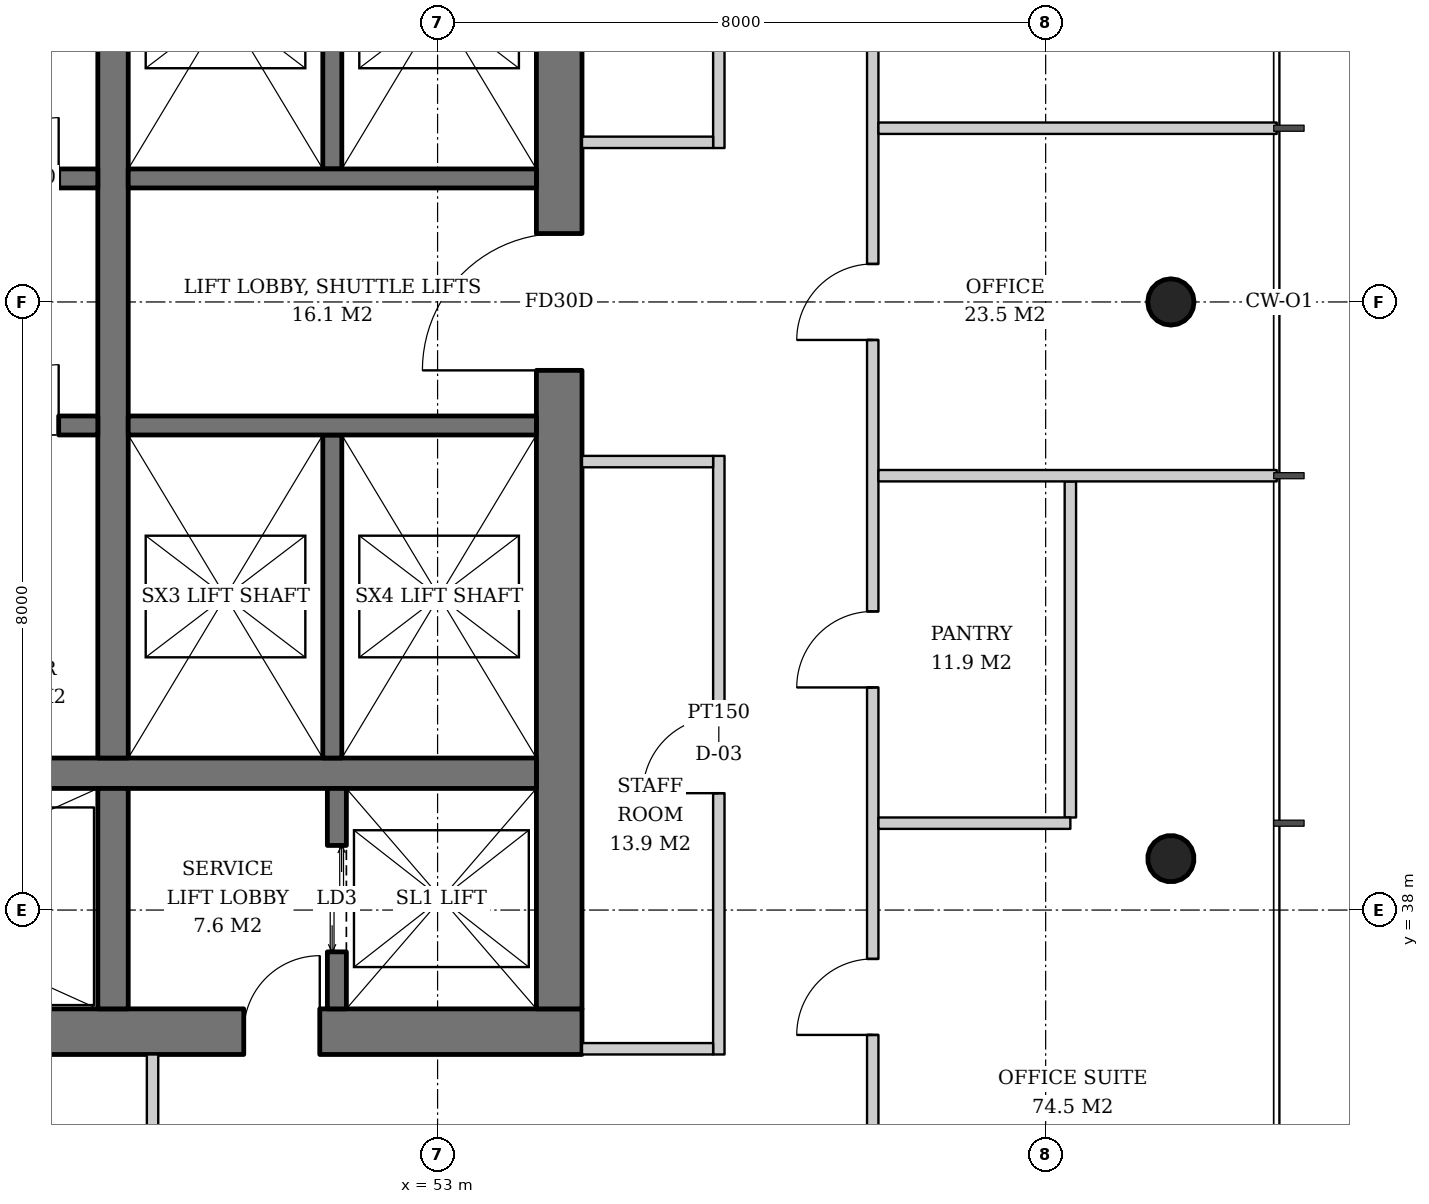
"""IFC4 building model, lengths in metres.
Left out: names, types, materials, properties, quantities, classifications, styles, units other than length and angle.
Written with IfcOpenShell. Run it as: python <this file> out.ifc"""

import sys

from ifc_helpers import new_model, si_unit, direction, frame, frame_2d, origin, origin_2d, place, context, subcontext, project, spatial, rectangle, hollow_circle, extrude, element, fill, save


model = new_model("IFC4")
c1 = context("Model", 3, precision=1e-05, world=origin(), true_north=direction((0.0, 1.0)))
c2 = subcontext(c1, "Body", "Model", "MODEL_VIEW")
j1 = project(units=[si_unit("LENGTHUNIT", "METRE"), si_unit("PLANEANGLEUNIT", "RADIAN")], contexts=[c1])
p1 = place(None, origin())
s1 = spatial("IfcSite", under=j1, at=p1, CompositionType="ELEMENT")
p2 = place(p1, origin())
s2 = spatial("IfcBuilding", under=s1, at=p2, CompositionType="ELEMENT")
p3 = place(p2, frame((0.0, 0.0, 218.6)))
s3 = spatial("IfcBuildingStorey", under=s2, at=p3, CompositionType="ELEMENT", Elevation=218.6)
p4 = place(p3, frame((62.686, 38.657, 0.0), z_axis=(-0.031976494272, 0.015924037308, 0.99936176075), x_axis=(-0.445775033553, -0.895145027055, 0.0)))
e1 = element("IfcColumn", 1, at=p4, inside=s3, PredefinedType="COLUMN", context=c2, shape_type="SweptSolid", body=[
    extrude(hollow_circle(Radius=0.305, WallThickness=0.025, at=origin_2d()), origin(), (0.0, 0.0, 1.0), 3.802),
])
p5 = place(p3, frame((62.686, 46.0, 0.0), z_axis=(-0.031980549263, 0.0, 0.999488491414), x_axis=(0.0, -1.0, 0.0)))
e2 = element("IfcColumn", 2, at=p5, inside=s3, PredefinedType="COLUMN", context=c2, shape_type="SweptSolid", body=[
    extrude(hollow_circle(Radius=0.305, WallThickness=0.025, at=origin_2d()), origin(), (0.0, 0.0, 1.0), 3.802),
])
p6 = place(p3, frame((35.1, 36.4, 0.0), z_axis=(0.0, 0.0, 1.0), x_axis=(1.0, 0.0, 0.0)))
e3 = element("IfcWall", 3, at=p6, inside=s3, PredefinedType="SHEAR", context=c2, shape_type="SweptSolid", body=[
    extrude(rectangle(XDim=19.8, YDim=0.6, at=frame_2d((9.9, 0.0))), origin(), (0.0, 0.0, 1.0), 3.8),
])
p7 = place(p6, frame((3.9, 0.0, 0.0)))
e4 = element("IfcOpeningElement", 4, at=p7, cuts=e3, PredefinedType="OPENING", context=c2, shape_type="SweptSolid", body=[
    extrude(rectangle(XDim=1.0, YDim=2.1, at=frame_2d((0.5, 1.05))), frame((0.0, 0.31, 0.0), z_axis=(0.0, -1.0, 0.0), x_axis=(1.0, 0.0, 0.0)), (0.0, 0.0, 1.0), 0.62),
])
p8 = place(p6, frame((15.35, 0.0, 0.0)))
e5 = element("IfcOpeningElement", 5, at=p8, cuts=e3, PredefinedType="OPENING", context=c2, shape_type="SweptSolid", body=[
    extrude(rectangle(XDim=1.0, YDim=2.1, at=frame_2d((0.5, 1.05))), frame((0.0, 0.31, 0.0), z_axis=(0.0, -1.0, 0.0), x_axis=(1.0, 0.0, 0.0)), (0.0, 0.0, 1.0), 0.62),
])
p9 = place(p3, frame((54.6, 36.7, 0.0), z_axis=(0.0, 0.0, 1.0), x_axis=(0.0, 1.0, 0.0)))
e6 = element("IfcWall", 6, at=p9, inside=s3, PredefinedType="SHEAR", context=c2, shape_type="SweptSolid", body=[
    extrude(rectangle(XDim=18.6, YDim=0.6, at=frame_2d((9.3, 0.0))), origin(), (0.0, 0.0, 1.0), 3.8),
])
p10 = place(p9, frame((8.4, 0.0, 0.0)))
e7 = element("IfcOpeningElement", 7, at=p10, cuts=e6, PredefinedType="OPENING", context=c2, shape_type="SweptSolid", body=[
    extrude(rectangle(XDim=1.8, YDim=2.4, at=frame_2d((0.9, 1.2))), frame((0.0, 0.31, 0.0), z_axis=(0.0, -1.0, 0.0), x_axis=(1.0, 0.0, 0.0)), (0.0, 0.0, 1.0), 0.62),
])
p11 = place(p3, frame((35.7, 39.8, 0.0), z_axis=(0.0, 0.0, 1.0), x_axis=(1.0, 0.0, 0.0)))
e8 = element("IfcWall", 8, at=p11, inside=s3, PredefinedType="SHEAR", context=c2, shape_type="SweptSolid", body=[
    extrude(rectangle(XDim=18.6, YDim=0.4, at=frame_2d((9.3, 0.0))), origin(), (0.0, 0.0, 1.0), 3.8),
])
p12 = place(p3, frame((48.73, 36.7, 0.0), z_axis=(0.0, 0.0, 1.0), x_axis=(0.0, 1.0, 0.0)))
e9 = element("IfcWall", 9, at=p12, inside=s3, PredefinedType="SHEAR", context=c2, shape_type="SweptSolid", body=[
    extrude(rectangle(XDim=2.9, YDim=0.4, at=frame_2d((1.45, 0.0))), origin(), (0.0, 0.0, 1.0), 3.8),
])
p13 = place(p3, frame((48.73, 40.0, 0.0), z_axis=(0.0, 0.0, 1.0), x_axis=(0.0, 1.0, 0.0)))
e10 = element("IfcWall", 10, at=p13, inside=s3, PredefinedType="SHEAR", context=c2, shape_type="SweptSolid", body=[
    extrude(rectangle(XDim=12.0, YDim=0.4, at=frame_2d((6.0, 0.0))), origin(), (0.0, 0.0, 1.0), 3.8),
])
p14 = place(p3, frame((51.675, 36.7, 0.0), z_axis=(0.0, 0.0, 1.0), x_axis=(0.0, 1.0, 0.0)))
e11 = element("IfcWall", 11, at=p14, inside=s3, PredefinedType="SHEAR", context=c2, shape_type="SweptSolid", body=[
    extrude(rectangle(XDim=2.9, YDim=0.25, at=frame_2d((1.45, 0.0))), origin(), (0.0, 0.0, 1.0), 3.8),
])
p15 = place(p14, frame((0.75, 0.0, 0.0)))
e12 = element("IfcOpeningElement", 12, at=p15, cuts=e11, PredefinedType="OPENING", context=c2, shape_type="SweptSolid", body=[
    extrude(rectangle(XDim=1.4, YDim=2.4, at=frame_2d((0.7, 1.2))), frame((0.0, 0.135, 0.0), z_axis=(0.0, -1.0, 0.0), x_axis=(1.0, 0.0, 0.0)), (0.0, 0.0, 1.0), 0.27),
])
p16 = place(p3, frame((35.7, 47.625, 0.0), z_axis=(0.0, 0.0, 1.0), x_axis=(1.0, 0.0, 0.0)))
e13 = element("IfcWall", 13, at=p16, inside=s3, PredefinedType="SHEAR", context=c2, shape_type="SweptSolid", body=[
    extrude(rectangle(XDim=12.83, YDim=0.25, at=frame_2d((6.415, 0.0))), origin(), (0.0, 0.0, 1.0), 3.8),
])
p17 = place(p16, frame((0.7, 0.0, 0.0)))
e14 = element("IfcOpeningElement", 14, at=p17, cuts=e13, PredefinedType="OPENING", context=c2, shape_type="SweptSolid", body=[
    extrude(rectangle(XDim=1.1, YDim=2.2, at=frame_2d((0.55, 1.1))), frame((0.0, 0.135, 0.0), z_axis=(0.0, -1.0, 0.0), x_axis=(1.0, 0.0, 0.0)), (0.0, 0.0, 1.0), 0.27),
])
p18 = place(p16, frame((3.45, 0.0, 0.0)))
e15 = element("IfcOpeningElement", 15, at=p18, cuts=e13, PredefinedType="OPENING", context=c2, shape_type="SweptSolid", body=[
    extrude(rectangle(XDim=1.1, YDim=2.2, at=frame_2d((0.55, 1.1))), frame((0.0, 0.135, 0.0), z_axis=(0.0, -1.0, 0.0), x_axis=(1.0, 0.0, 0.0)), (0.0, 0.0, 1.0), 0.27),
])
p19 = place(p16, frame((6.2, 0.0, 0.0)))
e16 = element("IfcOpeningElement", 16, at=p19, cuts=e13, PredefinedType="OPENING", context=c2, shape_type="SweptSolid", body=[
    extrude(rectangle(XDim=1.1, YDim=2.2, at=frame_2d((0.55, 1.1))), frame((0.0, 0.135, 0.0), z_axis=(0.0, -1.0, 0.0), x_axis=(1.0, 0.0, 0.0)), (0.0, 0.0, 1.0), 0.27),
])
p20 = place(p16, frame((9.0, 0.0, 0.0)))
e17 = element("IfcOpeningElement", 17, at=p20, cuts=e13, PredefinedType="OPENING", context=c2, shape_type="SweptSolid", body=[
    extrude(rectangle(XDim=1.0, YDim=2.1, at=frame_2d((0.5, 1.05))), frame((0.0, 0.135, 0.0), z_axis=(0.0, -1.0, 0.0), x_axis=(1.0, 0.0, 0.0)), (0.0, 0.0, 1.0), 0.27),
])
p21 = place(p16, frame((11.515, 0.0, 0.0)))
e18 = element("IfcOpeningElement", 18, at=p21, cuts=e13, PredefinedType="OPENING", context=c2, shape_type="SweptSolid", body=[
    extrude(rectangle(XDim=0.8, YDim=2.0, at=frame_2d((0.4, 1.0))), frame((0.0, 0.135, 0.0), z_axis=(0.0, -1.0, 0.0), x_axis=(1.0, 0.0, 0.0)), (0.0, 0.0, 1.0), 0.27),
])
p22 = place(p3, frame((35.7, 44.375, 0.0), z_axis=(0.0, 0.0, 1.0), x_axis=(1.0, 0.0, 0.0)))
e19 = element("IfcWall", 19, at=p22, inside=s3, PredefinedType="SHEAR", context=c2, shape_type="SweptSolid", body=[
    extrude(rectangle(XDim=12.83, YDim=0.25, at=frame_2d((6.415, 0.0))), origin(), (0.0, 0.0, 1.0), 3.8),
])
p23 = place(p22, frame((0.7, 0.0, 0.0)))
e20 = element("IfcOpeningElement", 20, at=p23, cuts=e19, PredefinedType="OPENING", context=c2, shape_type="SweptSolid", body=[
    extrude(rectangle(XDim=1.1, YDim=2.2, at=frame_2d((0.55, 1.1))), frame((0.0, 0.135, 0.0), z_axis=(0.0, -1.0, 0.0), x_axis=(1.0, 0.0, 0.0)), (0.0, 0.0, 1.0), 0.27),
])
p24 = place(p22, frame((3.45, 0.0, 0.0)))
e21 = element("IfcOpeningElement", 21, at=p24, cuts=e19, PredefinedType="OPENING", context=c2, shape_type="SweptSolid", body=[
    extrude(rectangle(XDim=1.1, YDim=2.2, at=frame_2d((0.55, 1.1))), frame((0.0, 0.135, 0.0), z_axis=(0.0, -1.0, 0.0), x_axis=(1.0, 0.0, 0.0)), (0.0, 0.0, 1.0), 0.27),
])
p25 = place(p22, frame((6.2, 0.0, 0.0)))
e22 = element("IfcOpeningElement", 22, at=p25, cuts=e19, PredefinedType="OPENING", context=c2, shape_type="SweptSolid", body=[
    extrude(rectangle(XDim=1.1, YDim=2.2, at=frame_2d((0.55, 1.1))), frame((0.0, 0.135, 0.0), z_axis=(0.0, -1.0, 0.0), x_axis=(1.0, 0.0, 0.0)), (0.0, 0.0, 1.0), 0.27),
])
p26 = place(p22, frame((9.0, 0.0, 0.0)))
e23 = element("IfcOpeningElement", 23, at=p26, cuts=e19, PredefinedType="OPENING", context=c2, shape_type="SweptSolid", body=[
    extrude(rectangle(XDim=1.0, YDim=2.1, at=frame_2d((0.5, 1.05))), frame((0.0, 0.135, 0.0), z_axis=(0.0, -1.0, 0.0), x_axis=(1.0, 0.0, 0.0)), (0.0, 0.0, 1.0), 0.27),
])
p27 = place(p22, frame((11.515, 0.0, 0.0)))
e24 = element("IfcOpeningElement", 24, at=p27, cuts=e19, PredefinedType="OPENING", context=c2, shape_type="SweptSolid", body=[
    extrude(rectangle(XDim=0.8, YDim=2.0, at=frame_2d((0.4, 1.0))), frame((0.0, 0.135, 0.0), z_axis=(0.0, -1.0, 0.0), x_axis=(1.0, 0.0, 0.0)), (0.0, 0.0, 1.0), 0.27),
])
p28 = place(p3, frame((51.615, 47.75, 0.0), z_axis=(0.0, 0.0, 1.0), x_axis=(0.0, 1.0, 0.0)))
e25 = element("IfcWall", 25, at=p28, inside=s3, PredefinedType="SHEAR", context=c2, shape_type="SweptSolid", body=[
    extrude(rectangle(XDim=4.25, YDim=0.25, at=frame_2d((2.125, 0.0))), origin(), (0.0, 0.0, 1.0), 3.8),
])
p29 = place(p3, frame((48.93, 47.625, 0.0), z_axis=(0.0, 0.0, 1.0), x_axis=(1.0, 0.0, 0.0)))
e26 = element("IfcWall", 26, at=p29, inside=s3, PredefinedType="SHEAR", context=c2, shape_type="SweptSolid", body=[
    extrude(rectangle(XDim=5.37, YDim=0.25, at=frame_2d((2.685, 0.0))), origin(), (0.0, 0.0, 1.0), 3.8),
])
p30 = place(p3, frame((51.615, 44.25, 0.0), z_axis=(0.0, 0.0, 1.0), x_axis=(0.0, -1.0, 0.0)))
e27 = element("IfcWall", 27, at=p30, inside=s3, PredefinedType="SHEAR", context=c2, shape_type="SweptSolid", body=[
    extrude(rectangle(XDim=4.25, YDim=0.25, at=frame_2d((2.125, 0.0))), origin(), (0.0, 0.0, 1.0), 3.8),
])
p31 = place(p3, frame((48.93, 44.375, 0.0), z_axis=(0.0, 0.0, 1.0), x_axis=(1.0, 0.0, 0.0)))
e28 = element("IfcWall", 28, at=p31, inside=s3, PredefinedType="SHEAR", context=c2, shape_type="SweptSolid", body=[
    extrude(rectangle(XDim=5.37, YDim=0.25, at=frame_2d((2.685, 0.0))), origin(), (0.0, 0.0, 1.0), 3.8),
])
p32 = place(p3, frame((56.7, 36.1, 0.0), z_axis=(0.0, 0.0, 1.0), x_axis=(0.0, 1.0, 0.0)))
e29 = element("IfcWall", 29, at=p32, inside=s3, PredefinedType="PARTITIONING", context=c2, shape_type="SweptSolid", body=[
    extrude(rectangle(XDim=7.875, YDim=0.15, at=frame_2d((3.938, 0.0))), origin(), (0.0, 0.0, 1.0), 2.867),
])
p33 = place(p32, frame((3.438, 0.0, 0.0)))
e30 = element("IfcOpeningElement", 30, at=p33, cuts=e29, PredefinedType="OPENING", context=c2, shape_type="SweptSolid", body=[
    extrude(rectangle(XDim=1.0, YDim=2.1, at=frame_2d((0.5, 1.05))), frame((0.0, 0.085, 0.0), z_axis=(0.0, -1.0, 0.0), x_axis=(1.0, 0.0, 0.0)), (0.0, 0.0, 1.0), 0.17),
])
p34 = place(p3, frame((54.9, 36.175, 0.0), z_axis=(0.0, 0.0, 1.0), x_axis=(1.0, 0.0, 0.0)))
e31 = element("IfcWall", 31, at=p34, inside=s3, PredefinedType="PARTITIONING", context=c2, shape_type="SweptSolid", body=[
    extrude(rectangle(XDim=1.725, YDim=0.15, at=frame_2d((0.863, 0.0))), origin(), (0.0, 0.0, 1.0), 2.92),
])
p35 = place(p3, frame((54.9, 43.9, 0.0), z_axis=(0.0, 0.0, 1.0), x_axis=(1.0, 0.0, 0.0)))
e32 = element("IfcWall", 32, at=p35, inside=s3, PredefinedType="PARTITIONING", context=c2, shape_type="SweptSolid", body=[
    extrude(rectangle(XDim=1.725, YDim=0.15, at=frame_2d((0.863, 0.0))), origin(), (0.0, 0.0, 1.0), 3.62),
])
p36 = place(p3, frame((56.7, 48.025, 0.0), z_axis=(0.0, 0.0, 1.0), x_axis=(0.0, 1.0, 0.0)))
e33 = element("IfcWall", 33, at=p36, inside=s3, PredefinedType="PARTITIONING", context=c2, shape_type="SweptSolid", body=[
    extrude(rectangle(XDim=7.875, YDim=0.15, at=frame_2d((3.938, 0.0))), origin(), (0.0, 0.0, 1.0), 2.867),
])
p37 = place(p36, frame((3.438, 0.0, 0.0)))
e34 = element("IfcOpeningElement", 34, at=p37, cuts=e33, PredefinedType="OPENING", context=c2, shape_type="SweptSolid", body=[
    extrude(rectangle(XDim=1.0, YDim=2.1, at=frame_2d((0.5, 1.05))), frame((0.0, 0.085, 0.0), z_axis=(0.0, -1.0, 0.0), x_axis=(1.0, 0.0, 0.0)), (0.0, 0.0, 1.0), 0.17),
])
for number, where, z_axis, x_axis in (
    (35, (54.9, 48.1, 0.0), (0.0, 0.0, 1.0), (1.0, 0.0, 0.0)),
    (36, (49.25, 36.1, 0.0), (0.0, 0.0, 1.0), (0.0, -1.0, 0.0)),
):
    element("IfcWall", number, at=place(p3, frame(where, z_axis=z_axis, x_axis=x_axis)), inside=s3, PredefinedType="PARTITIONING", context=c2, shape_type="SweptSolid", body=[
        extrude(rectangle(XDim=1.725, YDim=0.15, at=frame_2d((0.863, 0.0))), origin(), (0.0, 0.0, 1.0), 3.62),
    ])
p38 = place(p3, frame((61.325, 39.218, 0.0), z_axis=(0.0, 0.0, 1.0), x_axis=(0.0, 1.0, 0.0)))
e37 = element("IfcWall", 37, at=p38, inside=s3, PredefinedType="PARTITIONING", context=c2, shape_type="SweptSolid", body=[
    extrude(rectangle(XDim=4.422, YDim=0.15, at=frame_2d((2.211, 0.0))), origin(), (0.0, 0.0, 1.0), 2.867),
])
p39 = place(p3, frame((58.725, 33.764, 0.0), z_axis=(0.0, 0.0, 1.0), x_axis=(0.0, 1.0, 0.0)))
e38 = element("IfcWall", 38, at=p39, inside=s3, PredefinedType="PARTITIONING", context=c2, shape_type="SweptSolid", body=[
    extrude(rectangle(XDim=24.472, YDim=0.15, at=frame_2d((12.236, 0.0))), origin(), (0.0, 0.0, 1.0), 2.867),
])
p40 = place(p39, frame((2.593, 0.0, 0.0)))
e39 = element("IfcOpeningElement", 39, at=p40, cuts=e38, PredefinedType="OPENING", context=c2, shape_type="SweptSolid", body=[
    extrude(rectangle(XDim=1.0, YDim=2.1, at=frame_2d((0.5, 1.05))), frame((0.0, 0.085, 0.0), z_axis=(0.0, -1.0, 0.0), x_axis=(1.0, 0.0, 0.0)), (0.0, 0.0, 1.0), 0.17),
])
p41 = place(p39, frame((7.164, 0.0, 0.0)))
e40 = element("IfcOpeningElement", 40, at=p41, cuts=e38, PredefinedType="OPENING", context=c2, shape_type="SweptSolid", body=[
    extrude(rectangle(XDim=1.0, YDim=2.1, at=frame_2d((0.5, 1.05))), frame((0.0, 0.085, 0.0), z_axis=(0.0, -1.0, 0.0), x_axis=(1.0, 0.0, 0.0)), (0.0, 0.0, 1.0), 0.17),
])
p42 = place(p39, frame((11.736, 0.0, 0.0)))
e41 = element("IfcOpeningElement", 41, at=p42, cuts=e38, PredefinedType="OPENING", context=c2, shape_type="SweptSolid", body=[
    extrude(rectangle(XDim=1.0, YDim=2.1, at=frame_2d((0.5, 1.05))), frame((0.0, 0.085, 0.0), z_axis=(0.0, -1.0, 0.0), x_axis=(1.0, 0.0, 0.0)), (0.0, 0.0, 1.0), 0.17),
])
p43 = place(p39, frame((16.307, 0.0, 0.0)))
e42 = element("IfcOpeningElement", 42, at=p43, cuts=e38, PredefinedType="OPENING", context=c2, shape_type="SweptSolid", body=[
    extrude(rectangle(XDim=1.0, YDim=2.1, at=frame_2d((0.5, 1.05))), frame((0.0, 0.085, 0.0), z_axis=(0.0, -1.0, 0.0), x_axis=(1.0, 0.0, 0.0)), (0.0, 0.0, 1.0), 0.17),
])
p44 = place(p39, frame((20.879, 0.0, 0.0)))
e43 = element("IfcOpeningElement", 43, at=p44, cuts=e38, PredefinedType="OPENING", context=c2, shape_type="SweptSolid", body=[
    extrude(rectangle(XDim=1.0, YDim=2.1, at=frame_2d((0.5, 1.05))), frame((0.0, 0.085, 0.0), z_axis=(0.0, -1.0, 0.0), x_axis=(1.0, 0.0, 0.0)), (0.0, 0.0, 1.0), 0.17),
])
p45 = place(p3, frame((58.8, 39.143, 0.0), z_axis=(0.0, 0.0, 1.0), x_axis=(1.0, 0.0, 0.0)))
e44 = element("IfcWall", 44, at=p45, inside=s3, PredefinedType="PARTITIONING", context=c2, shape_type="SweptSolid", body=[
    extrude(rectangle(XDim=2.525, YDim=0.15, at=frame_2d((1.262, 0.0))), origin(), (0.0, 0.0, 1.0), 3.62),
])
for number, where, z_axis, x_axis in (
    (45, (58.8, 43.714, 0.0), (0.0, 0.0, 1.0), (1.0, 0.0, 0.0)),
    (46, (58.8, 48.286, 0.0), (0.0, 0.0, 1.0), (1.0, 0.0, 0.0)),
):
    element("IfcWall", number, at=place(p3, frame(where, z_axis=z_axis, x_axis=x_axis)), inside=s3, PredefinedType="PARTITIONING", context=c2, shape_type="SweptSolid", body=[
        extrude(rectangle(XDim=5.24, YDim=0.15, at=frame_2d((2.62, 0.0))), origin(), (0.0, 0.0, 1.0), 3.12),
    ])
p46 = place(p15, origin())
e47 = element("IfcDoor", 47, at=p46, inside=s3, OperationType="DOUBLE_DOOR_SLIDING", PredefinedType="DOOR", context=c2, shape_type="SweptSolid", body=[
    extrude(rectangle(XDim=1.4, YDim=2.4, at=frame_2d((0.7, 1.2))), frame((0.0, 0.025, 0.0), z_axis=(0.0, -1.0, 0.0), x_axis=(1.0, 0.0, 0.0)), (0.0, 0.0, 1.0), 0.05),
])
fill(e12, e47)
p47 = place(p21, origin())
e48 = element("IfcDoor", 48, at=p47, inside=s3, OperationType="SINGLE_SWING_RIGHT", PredefinedType="DOOR", context=c2, shape_type="SweptSolid", body=[
    extrude(rectangle(XDim=0.8, YDim=2.0, at=frame_2d((0.4, 1.0))), frame((0.0, 0.025, 0.0), z_axis=(0.0, -1.0, 0.0), x_axis=(1.0, 0.0, 0.0)), (0.0, 0.0, 1.0), 0.05),
])
fill(e18, e48)
p48 = place(p27, origin())
e49 = element("IfcDoor", 49, at=p48, inside=s3, OperationType="SINGLE_SWING_RIGHT", PredefinedType="DOOR", context=c2, shape_type="SweptSolid", body=[
    extrude(rectangle(XDim=0.8, YDim=2.0, at=frame_2d((0.4, 1.0))), frame((0.0, 0.025, 0.0), z_axis=(0.0, -1.0, 0.0), x_axis=(1.0, 0.0, 0.0)), (0.0, 0.0, 1.0), 0.05),
])
fill(e24, e49)
p49 = place(p10, origin())
e50 = element("IfcDoor", 50, at=p49, inside=s3, OperationType="DOUBLE_DOOR_SINGLE_SWING", PredefinedType="DOOR", context=c2, shape_type="SweptSolid", body=[
    extrude(rectangle(XDim=1.8, YDim=2.4, at=frame_2d((0.9, 1.2))), frame((0.0, 0.025, 0.0), z_axis=(0.0, -1.0, 0.0), x_axis=(1.0, 0.0, 0.0)), (0.0, 0.0, 1.0), 0.05),
])
fill(e7, e50)
p50 = place(p8, origin())
e51 = element("IfcDoor", 51, at=p50, inside=s3, OperationType="SINGLE_SWING_RIGHT", PredefinedType="DOOR", context=c2, shape_type="SweptSolid", body=[
    extrude(rectangle(XDim=1.0, YDim=2.1, at=frame_2d((0.5, 1.05))), frame((0.0, 0.025, 0.0), z_axis=(0.0, -1.0, 0.0), x_axis=(1.0, 0.0, 0.0)), (0.0, 0.0, 1.0), 0.05),
])
fill(e5, e51)
p51 = place(p33, origin())
e52 = element("IfcDoor", 52, at=p51, inside=s3, OperationType="SINGLE_SWING_LEFT", PredefinedType="DOOR", context=c2, shape_type="SweptSolid", body=[
    extrude(rectangle(XDim=1.0, YDim=2.1, at=frame_2d((0.5, 1.05))), frame((0.0, 0.025, 0.0), z_axis=(0.0, -1.0, 0.0), x_axis=(1.0, 0.0, 0.0)), (0.0, 0.0, 1.0), 0.05),
])
fill(e30, e52)
p52 = place(p40, origin())
e53 = element("IfcDoor", 53, at=p52, inside=s3, OperationType="SINGLE_SWING_LEFT", PredefinedType="DOOR", context=c2, shape_type="SweptSolid", body=[
    extrude(rectangle(XDim=1.0, YDim=2.1, at=frame_2d((0.5, 1.05))), frame((0.0, 0.025, 0.0), z_axis=(0.0, -1.0, 0.0), x_axis=(1.0, 0.0, 0.0)), (0.0, 0.0, 1.0), 0.05),
])
fill(e39, e53)
p53 = place(p41, origin())
e54 = element("IfcDoor", 54, at=p53, inside=s3, OperationType="SINGLE_SWING_LEFT", PredefinedType="DOOR", context=c2, shape_type="SweptSolid", body=[
    extrude(rectangle(XDim=1.0, YDim=2.1, at=frame_2d((0.5, 1.05))), frame((0.0, 0.025, 0.0), z_axis=(0.0, -1.0, 0.0), x_axis=(1.0, 0.0, 0.0)), (0.0, 0.0, 1.0), 0.05),
])
fill(e40, e54)
p54 = place(p42, origin())
e55 = element("IfcDoor", 55, at=p54, inside=s3, OperationType="SINGLE_SWING_LEFT", PredefinedType="DOOR", context=c2, shape_type="SweptSolid", body=[
    extrude(rectangle(XDim=1.0, YDim=2.1, at=frame_2d((0.5, 1.05))), frame((0.0, 0.025, 0.0), z_axis=(0.0, -1.0, 0.0), x_axis=(1.0, 0.0, 0.0)), (0.0, 0.0, 1.0), 0.05),
])
fill(e41, e55)
save(model, sys.argv[1])
